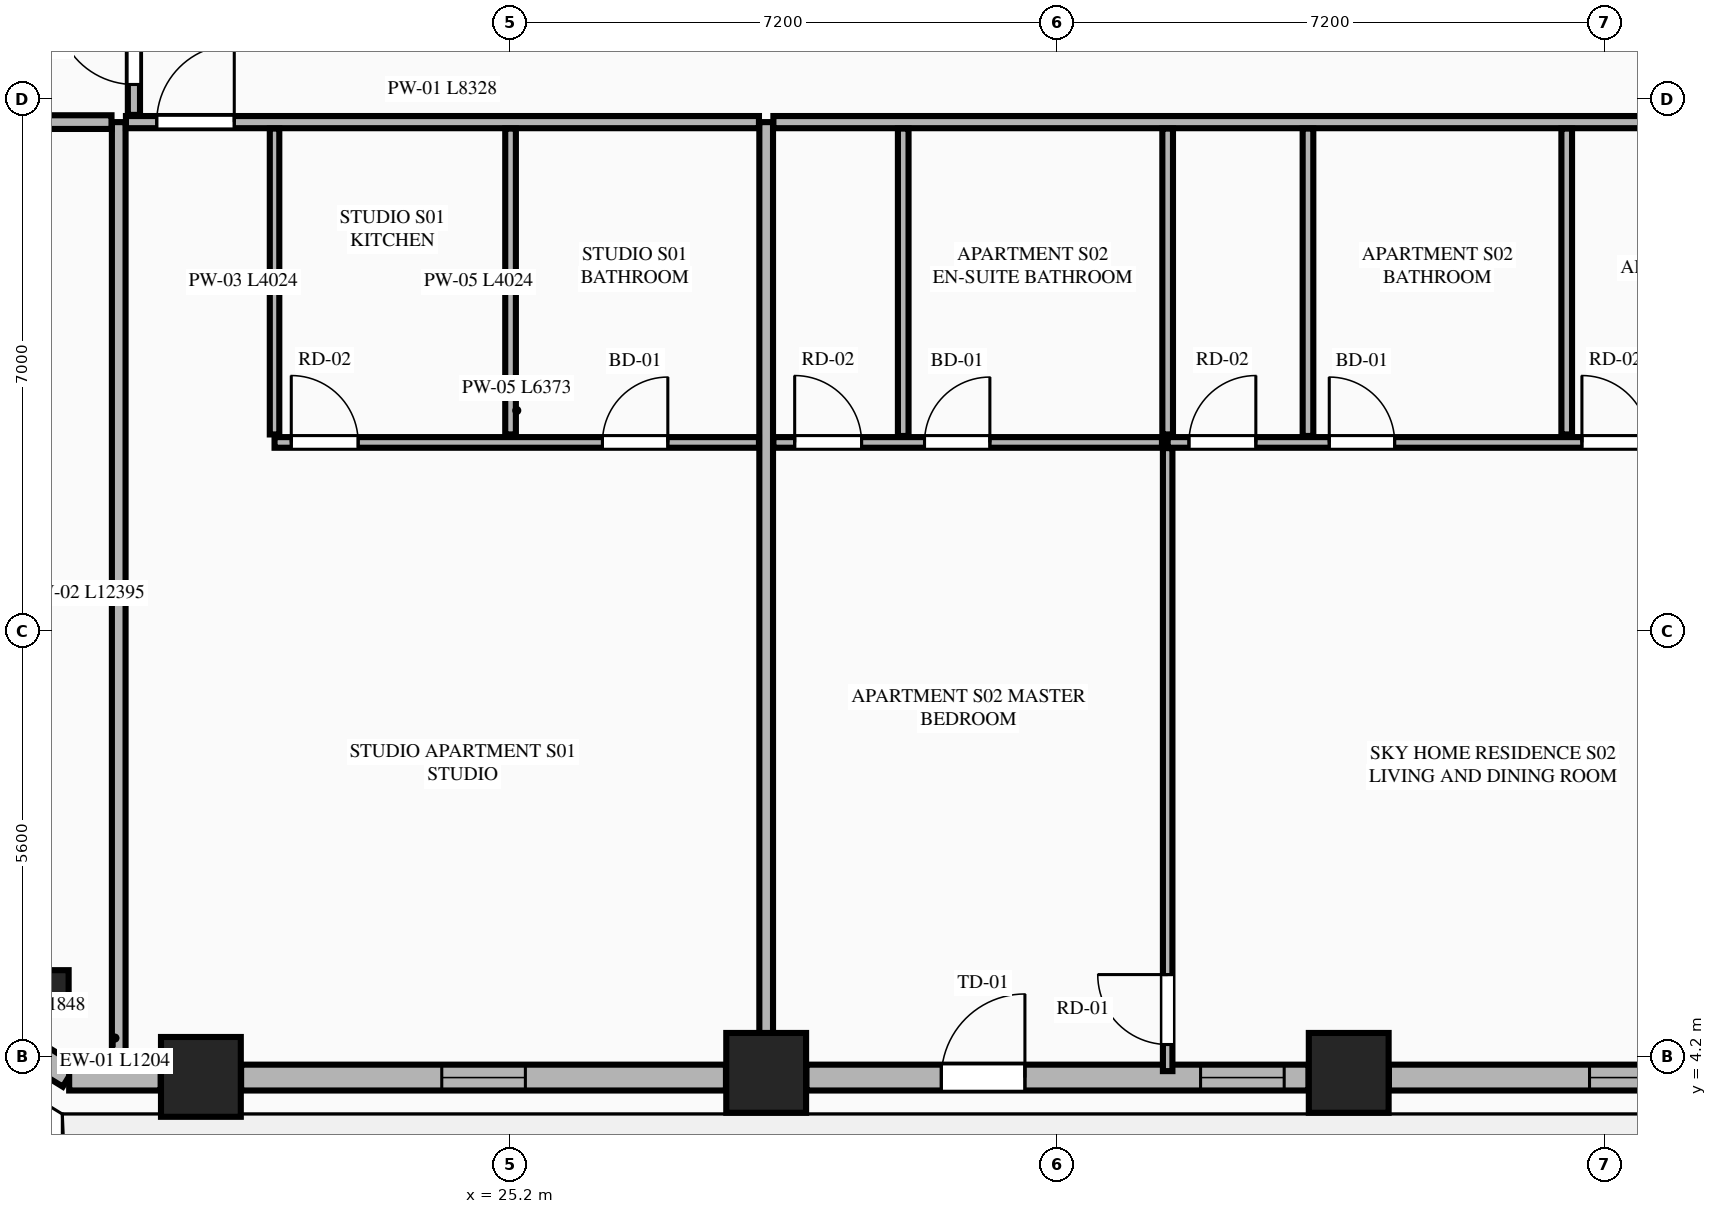
"""IFC4 building model, lengths in metres.
Left out: names, types, materials, properties, quantities, classifications, styles, units other than length and angle.
Written with IfcOpenShell. Run it as: python <this file> out.ifc"""

import sys

from ifc_helpers import new_model, si_unit, direction, frame, frame_2d, origin, origin_2d, place, context, subcontext, project, spatial, rectangle, extrude, element, fill, save


model = new_model("IFC4")
c1 = context("Model", 3, precision=1e-05, world=origin(), true_north=direction((0.0, 1.0)))
c2 = subcontext(c1, "Body", "Model", "MODEL_VIEW")
j1 = project(units=[si_unit("LENGTHUNIT", "METRE"), si_unit("PLANEANGLEUNIT", "RADIAN")], contexts=[c1])
p1 = place(None, origin())
s1 = spatial("IfcSite", under=j1, at=p1, CompositionType="ELEMENT")
p2 = place(p1, origin())
s2 = spatial("IfcBuilding", under=s1, at=p2, CompositionType="ELEMENT")
p3 = place(p2, frame((0.0, 0.0, 116.15)))
s3 = spatial("IfcBuildingStorey", under=s2, at=p3, CompositionType="ELEMENT", Elevation=116.15)
for number, where, z_axis, x_axis in (
    (1, (21.131, 3.939, 0.0), (0.0, 0.0, 1.0), (1.0, 0.0, 0.0)),
    (2, (28.568, 3.992, 0.0), (0.0, 0.0, 1.0), (1.0, 0.0, 0.0)),
    (3, (36.232, 3.992, 0.0), (0.0, 0.0, 1.0), (1.0, 0.0, 0.0)),
):
    element("IfcColumn", number, at=place(p3, frame(where, z_axis=z_axis, x_axis=x_axis)), inside=s3, PredefinedType="COLUMN", context=c2, shape_type="SweptSolid", body=[
        extrude(rectangle(XDim=1.05, YDim=1.05, at=origin_2d()), origin(), (0.0, 0.0, 1.0), 3.55),
    ])
p4 = place(p3, frame((19.141, 5.093, 0.0), z_axis=(0.0, 0.0, 1.0), x_axis=(0.865160173452, -0.501495637342, 0.0)))
e4 = element("IfcColumn", 4, at=p4, inside=s3, PredefinedType="PILASTER", context=c2, shape_type="SweptSolid", body=[
    extrude(rectangle(XDim=0.5, YDim=0.35, at=origin_2d()), origin(), (0.0, 0.0, 1.0), 3.55),
])
p5 = place(p3, frame((17.829, 4.923, 0.0), z_axis=(0.0, 0.0, 1.0), x_axis=(0.851798915137, -0.523868884523, 0.0)))
e5 = element("IfcWall", 5, at=p5, inside=s3, PredefinedType="STANDARD", context=c2, shape_type="SweptSolid", body=[
    extrude(rectangle(XDim=1.848, YDim=0.34, at=frame_2d((0.924, 0.0))), origin(), (0.0, 0.0, 1.0), 3.34),
])
p6 = place(p3, frame((19.398, 3.93, 0.0), z_axis=(0.0, 0.0, 1.0), x_axis=(1.0, 0.0, 0.0)))
e6 = element("IfcWall", 6, at=p6, inside=s3, PredefinedType="STANDARD", context=c2, shape_type="SweptSolid", body=[
    extrude(rectangle(XDim=1.204, YDim=0.34, at=frame_2d((0.602, 0.0))), origin(), (0.0, 0.0, 1.0), 3.34),
])
p7 = place(p3, frame((21.66, 3.93, 0.0), z_axis=(0.0, 0.0, 1.0), x_axis=(1.0, 0.0, 0.0)))
e7 = element("IfcWall", 7, at=p7, inside=s3, PredefinedType="STANDARD", context=c2, shape_type="SweptSolid", body=[
    extrude(rectangle(XDim=6.379, YDim=0.34, at=frame_2d((3.189, 0.0))), origin(), (0.0, 0.0, 1.0), 2.797),
])
p8 = place(p7, frame((2.64, 0.0, 0.75)))
e8 = element("IfcOpeningElement", 8, at=p8, cuts=e7, PredefinedType="OPENING", context=c2, shape_type="SweptSolid", body=[
    extrude(rectangle(XDim=1.1, YDim=1.897, at=frame_2d((0.55, 0.948))), frame((0.0, 0.18, 0.0), z_axis=(0.0, -1.0, 0.0), x_axis=(1.0, 0.0, 0.0)), (0.0, 0.0, 1.0), 0.36),
])
p9 = place(p3, frame((29.097, 3.93, 0.0), z_axis=(0.0, 0.0, 1.0), x_axis=(1.0, 0.0, 0.0)))
e9 = element("IfcWall", 9, at=p9, inside=s3, PredefinedType="STANDARD", context=c2, shape_type="SweptSolid", body=[
    extrude(rectangle(XDim=6.606, YDim=0.34, at=frame_2d((3.303, 0.0))), origin(), (0.0, 0.0, 1.0), 2.797),
])
p10 = place(p9, frame((1.775, 0.0, 0.0)))
e10 = element("IfcOpeningElement", 10, at=p10, cuts=e9, PredefinedType="OPENING", context=c2, shape_type="SweptSolid", body=[
    extrude(rectangle(XDim=1.1, YDim=2.25, at=frame_2d((0.55, 1.125))), frame((0.0, 0.18, 0.0), z_axis=(0.0, -1.0, 0.0), x_axis=(1.0, 0.0, 0.0)), (0.0, 0.0, 1.0), 0.36),
])
p11 = place(p9, frame((5.186, 0.0, 0.75)))
e11 = element("IfcOpeningElement", 11, at=p11, cuts=e9, PredefinedType="OPENING", context=c2, shape_type="SweptSolid", body=[
    extrude(rectangle(XDim=1.1, YDim=1.897, at=frame_2d((0.55, 0.948))), frame((0.0, 0.18, 0.0), z_axis=(0.0, -1.0, 0.0), x_axis=(1.0, 0.0, 0.0)), (0.0, 0.0, 1.0), 0.36),
])
p12 = place(p3, frame((36.761, 3.93, 0.0), z_axis=(0.0, 0.0, 1.0), x_axis=(1.0, 0.0, 0.0)))
e12 = element("IfcWall", 12, at=p12, inside=s3, PredefinedType="STANDARD", context=c2, shape_type="SweptSolid", body=[
    extrude(rectangle(XDim=6.379, YDim=0.34, at=frame_2d((3.189, 0.0))), origin(), (0.0, 0.0, 1.0), 2.797),
])
p13 = place(p12, frame((2.639, 0.0, 0.75)))
e13 = element("IfcOpeningElement", 13, at=p13, cuts=e12, PredefinedType="OPENING", context=c2, shape_type="SweptSolid", body=[
    extrude(rectangle(XDim=1.1, YDim=1.897, at=frame_2d((0.55, 0.948))), frame((0.0, 0.18, 0.0), z_axis=(0.0, -1.0, 0.0), x_axis=(1.0, 0.0, 0.0)), (0.0, 0.0, 1.0), 0.36),
])
p14 = place(p3, frame((20.05, 4.105, 0.0), z_axis=(0.0, 0.0, 1.0), x_axis=(0.0, 1.0, 0.0)))
e14 = element("IfcWall", 14, at=p14, inside=s3, PredefinedType="PARTITIONING", context=c2, shape_type="SweptSolid", body=[
    extrude(rectangle(XDim=12.395, YDim=0.18, at=frame_2d((6.198, 0.0))), origin(), (0.0, 0.0, 1.0), 3.34),
])
p15 = place(p3, frame((28.568, 4.105, 0.0), z_axis=(0.0, 0.0, 1.0), x_axis=(0.0, 1.0, 0.0)))
e15 = element("IfcWall", 15, at=p15, inside=s3, PredefinedType="PARTITIONING", context=c2, shape_type="SweptSolid", body=[
    extrude(rectangle(XDim=12.395, YDim=0.18, at=frame_2d((6.198, 0.0))), origin(), (0.0, 0.0, 1.0), 2.722),
])
p16 = place(p3, frame((20.145, 16.5, 0.0), z_axis=(0.0, 0.0, 1.0), x_axis=(1.0, 0.0, 0.0)))
e16 = element("IfcWall", 16, at=p16, inside=s3, PredefinedType="PARTITIONING", context=c2, shape_type="SweptSolid", body=[
    extrude(rectangle(XDim=8.328, YDim=0.16, at=frame_2d((4.164, 0.0))), origin(), (0.0, 0.0, 1.0), 3.34),
])
p17 = place(p16, frame((0.405, 0.0, 0.0)))
e17 = element("IfcOpeningElement", 17, at=p17, cuts=e16, PredefinedType="OPENING", context=c2, shape_type="SweptSolid", body=[
    extrude(rectangle(XDim=1.02, YDim=2.25, at=frame_2d((0.51, 1.125))), frame((0.0, 0.09, 0.0), z_axis=(0.0, -1.0, 0.0), x_axis=(1.0, 0.0, 0.0)), (0.0, 0.0, 1.0), 0.18),
])
p18 = place(p3, frame((22.1, 12.391, 0.0), z_axis=(0.0, 0.0, 1.0), x_axis=(0.0, 1.0, 0.0)))
e18 = element("IfcWall", 18, at=p18, inside=s3, PredefinedType="PARTITIONING", context=c2, shape_type="SweptSolid", body=[
    extrude(rectangle(XDim=4.024, YDim=0.125, at=frame_2d((2.012, 0.0))), origin(), (0.0, 0.0, 1.0), 2.722),
])
p19 = place(p3, frame((22.1, 12.286, 0.0), z_axis=(0.0, 0.0, 1.0), x_axis=(1.0, 0.0, 0.0)))
e19 = element("IfcWall", 19, at=p19, inside=s3, PredefinedType="PLUMBINGWALL", context=c2, shape_type="SweptSolid", body=[
    extrude(rectangle(XDim=6.373, YDim=0.14, at=frame_2d((3.187, 0.0))), origin(), (0.0, 0.0, 1.0), 3.34),
])
p20 = place(p19, frame((4.314, 0.0, 0.0)))
e20 = element("IfcOpeningElement", 20, at=p20, cuts=e19, PredefinedType="OPENING", context=c2, shape_type="SweptSolid", body=[
    extrude(rectangle(XDim=0.86, YDim=2.1, at=frame_2d((0.43, 1.05))), frame((0.0, 0.08, 0.0), z_axis=(0.0, -1.0, 0.0), x_axis=(1.0, 0.0, 0.0)), (0.0, 0.0, 1.0), 0.16),
])
p21 = place(p19, frame((0.22, 0.0, 0.0)))
e21 = element("IfcOpeningElement", 21, at=p21, cuts=e19, PredefinedType="OPENING", context=c2, shape_type="SweptSolid", body=[
    extrude(rectangle(XDim=0.88, YDim=2.15, at=frame_2d((0.44, 1.075))), frame((0.0, 0.08, 0.0), z_axis=(0.0, -1.0, 0.0), x_axis=(1.0, 0.0, 0.0)), (0.0, 0.0, 1.0), 0.16),
])
p22 = place(p3, frame((25.205, 12.391, 0.0), z_axis=(0.0, 0.0, 1.0), x_axis=(0.0, 1.0, 0.0)))
e22 = element("IfcWall", 22, at=p22, inside=s3, PredefinedType="PLUMBINGWALL", context=c2, shape_type="SweptSolid", body=[
    extrude(rectangle(XDim=4.024, YDim=0.14, at=frame_2d((2.012, 0.0))), origin(), (0.0, 0.0, 1.0), 3.34),
])
p23 = place(p3, frame((28.663, 16.5, 0.0), z_axis=(0.0, 0.0, 1.0), x_axis=(1.0, 0.0, 0.0)))
e23 = element("IfcWall", 23, at=p23, inside=s3, PredefinedType="PARTITIONING", context=c2, shape_type="SweptSolid", body=[
    extrude(rectangle(XDim=15.992, YDim=0.16, at=frame_2d((7.996, 0.0))), origin(), (0.0, 0.0, 1.0), 3.34),
])
p24 = place(p23, frame((14.087, 0.0, 0.0)))
e24 = element("IfcOpeningElement", 24, at=p24, cuts=e23, PredefinedType="OPENING", context=c2, shape_type="SweptSolid", body=[
    extrude(rectangle(XDim=1.02, YDim=2.25, at=frame_2d((0.51, 1.125))), frame((0.0, 0.09, 0.0), z_axis=(0.0, -1.0, 0.0), x_axis=(1.0, 0.0, 0.0)), (0.0, 0.0, 1.0), 0.18),
])
p25 = place(p3, frame((33.85, 12.286, 0.0), z_axis=(0.0, 0.0, 1.0), x_axis=(1.0, 0.0, 0.0)))
e25 = element("IfcWall", 25, at=p25, inside=s3, PredefinedType="PLUMBINGWALL", context=c2, shape_type="SweptSolid", body=[
    extrude(rectangle(XDim=8.65, YDim=0.14, at=frame_2d((4.325, 0.0))), origin(), (0.0, 0.0, 1.0), 3.34),
])
p26 = place(p25, frame((0.28, 0.0, 0.0)))
e26 = element("IfcOpeningElement", 26, at=p26, cuts=e25, PredefinedType="OPENING", context=c2, shape_type="SweptSolid", body=[
    extrude(rectangle(XDim=0.88, YDim=2.15, at=frame_2d((0.44, 1.075))), frame((0.0, 0.08, 0.0), z_axis=(0.0, -1.0, 0.0), x_axis=(1.0, 0.0, 0.0)), (0.0, 0.0, 1.0), 0.16),
])
p27 = place(p25, frame((2.126, 0.0, 0.0)))
e27 = element("IfcOpeningElement", 27, at=p27, cuts=e25, PredefinedType="OPENING", context=c2, shape_type="SweptSolid", body=[
    extrude(rectangle(XDim=0.86, YDim=2.1, at=frame_2d((0.43, 1.05))), frame((0.0, 0.08, 0.0), z_axis=(0.0, -1.0, 0.0), x_axis=(1.0, 0.0, 0.0)), (0.0, 0.0, 1.0), 0.16),
])
p28 = place(p25, frame((5.45, 0.0, 0.0)))
e28 = element("IfcOpeningElement", 28, at=p28, cuts=e25, PredefinedType="OPENING", context=c2, shape_type="SweptSolid", body=[
    extrude(rectangle(XDim=0.88, YDim=2.15, at=frame_2d((0.44, 1.075))), frame((0.0, 0.08, 0.0), z_axis=(0.0, -1.0, 0.0), x_axis=(1.0, 0.0, 0.0)), (0.0, 0.0, 1.0), 0.16),
])
p29 = place(p3, frame((28.663, 12.286, 0.0), z_axis=(0.0, 0.0, 1.0), x_axis=(1.0, 0.0, 0.0)))
e29 = element("IfcWall", 29, at=p29, inside=s3, PredefinedType="PLUMBINGWALL", context=c2, shape_type="SweptSolid", body=[
    extrude(rectangle(XDim=5.112, YDim=0.14, at=frame_2d((2.556, 0.0))), origin(), (0.0, 0.0, 1.0), 3.34),
])
p30 = place(p29, frame((0.28, 0.0, 0.0)))
e30 = element("IfcOpeningElement", 30, at=p30, cuts=e29, PredefinedType="OPENING", context=c2, shape_type="SweptSolid", body=[
    extrude(rectangle(XDim=0.88, YDim=2.15, at=frame_2d((0.44, 1.075))), frame((0.0, 0.08, 0.0), z_axis=(0.0, -1.0, 0.0), x_axis=(1.0, 0.0, 0.0)), (0.0, 0.0, 1.0), 0.16),
])
p31 = place(p29, frame((1.988, 0.0, 0.0)))
e31 = element("IfcOpeningElement", 31, at=p31, cuts=e29, PredefinedType="OPENING", context=c2, shape_type="SweptSolid", body=[
    extrude(rectangle(XDim=0.86, YDim=2.1, at=frame_2d((0.43, 1.05))), frame((0.0, 0.08, 0.0), z_axis=(0.0, -1.0, 0.0), x_axis=(1.0, 0.0, 0.0)), (0.0, 0.0, 1.0), 0.16),
])
for number, where, z_axis, x_axis in (
    (32, (39.1, 12.391, 0.0), (0.0, 0.0, 1.0), (0.0, 1.0, 0.0)),
    (33, (33.85, 12.391, 0.0), (0.0, 0.0, 1.0), (0.0, 1.0, 0.0)),
):
    element("IfcWall", number, at=place(p3, frame(where, z_axis=z_axis, x_axis=x_axis)), inside=s3, PredefinedType="PLUMBINGWALL", context=c2, shape_type="SweptSolid", body=[
        extrude(rectangle(XDim=4.024, YDim=0.14, at=frame_2d((2.012, 0.0))), origin(), (0.0, 0.0, 1.0), 3.34),
    ])
p32 = place(p3, frame((33.85, 4.015, 0.0), z_axis=(0.0, 0.0, 1.0), x_axis=(0.0, 1.0, 0.0)))
e34 = element("IfcWall", 34, at=p32, inside=s3, PredefinedType="PARTITIONING", context=c2, shape_type="SweptSolid", body=[
    extrude(rectangle(XDim=8.196, YDim=0.125, at=frame_2d((4.098, 0.0))), origin(), (0.0, 0.0, 1.0), 3.34),
])
p33 = place(p32, frame((0.35, 0.0, 0.0)))
e35 = element("IfcOpeningElement", 35, at=p33, cuts=e34, PredefinedType="OPENING", context=c2, shape_type="SweptSolid", body=[
    extrude(rectangle(XDim=0.92, YDim=2.15, at=frame_2d((0.46, 1.075))), frame((0.0, 0.073, 0.0), z_axis=(0.0, -1.0, 0.0), x_axis=(1.0, 0.0, 0.0)), (0.0, 0.0, 1.0), 0.145),
])
for number, where, z_axis, x_axis in (
    (36, (35.696, 12.371, 0.0), (0.0, 0.0, 1.0), (0.0, 1.0, 0.0)),
    (37, (30.371, 12.371, 0.0), (0.0, 0.0, 1.0), (0.0, 1.0, 0.0)),
):
    element("IfcWall", number, at=place(p3, frame(where, z_axis=z_axis, x_axis=x_axis)), inside=s3, PredefinedType="PLUMBINGWALL", context=c2, shape_type="SweptSolid", body=[
        extrude(rectangle(XDim=4.044, YDim=0.14, at=frame_2d((2.022, 0.0))), origin(), (0.0, 0.0, 1.0), 3.34),
    ])
p34 = place(p3, frame((12.185, 16.5, 0.0), z_axis=(0.0, 0.0, 1.0), x_axis=(1.0, 0.0, 0.0)))
e38 = element("IfcWall", 38, at=p34, inside=s3, PredefinedType="PARTITIONING", context=c2, shape_type="SweptSolid", body=[
    extrude(rectangle(XDim=7.77, YDim=0.18, at=frame_2d((3.885, 0.0))), origin(), (0.0, 0.0, 1.0), 3.34),
])
p35 = place(p3, frame((20.25, 16.595, 0.0), z_axis=(0.0, 0.0, 1.0), x_axis=(0.0, 1.0, 0.0)))
e39 = element("IfcWall", 39, at=p35, inside=s3, PredefinedType="PARTITIONING", context=c2, shape_type="SweptSolid", body=[
    extrude(rectangle(XDim=6.39, YDim=0.16, at=frame_2d((3.195, 0.0))), origin(), (0.0, 0.0, 1.0), 3.34),
])
p36 = place(p35, frame((0.4, 0.0, 0.0)))
e40 = element("IfcOpeningElement", 40, at=p36, cuts=e39, PredefinedType="OPENING", context=c2, shape_type="SweptSolid", body=[
    extrude(rectangle(XDim=1.02, YDim=2.25, at=frame_2d((0.51, 1.125))), frame((0.0, 0.09, 0.0), z_axis=(0.0, -1.0, 0.0), x_axis=(1.0, 0.0, 0.0)), (0.0, 0.0, 1.0), 0.18),
])
p37 = place(p8, origin())
e41 = element("IfcWindow", 41, at=p37, inside=s3, PartitioningType="SINGLE_PANEL", PredefinedType="WINDOW", context=c2, shape_type="SweptSolid", body=[
    extrude(rectangle(XDim=1.1, YDim=1.897, at=frame_2d((0.55, 0.948))), frame((0.0, 0.03, 0.0), z_axis=(0.0, -1.0, 0.0), x_axis=(1.0, 0.0, 0.0)), (0.0, 0.0, 1.0), 0.06),
])
fill(e8, e41)
p38 = place(p10, origin())
e42 = element("IfcDoor", 42, at=p38, inside=s3, OperationType="SINGLE_SWING_RIGHT", PredefinedType="DOOR", context=c2, shape_type="SweptSolid", body=[
    extrude(rectangle(XDim=1.1, YDim=2.25, at=frame_2d((0.55, 1.125))), frame((0.0, 0.025, 0.0), z_axis=(0.0, -1.0, 0.0), x_axis=(1.0, 0.0, 0.0)), (0.0, 0.0, 1.0), 0.05),
])
fill(e10, e42)
p39 = place(p13, origin())
e43 = element("IfcWindow", 43, at=p39, inside=s3, PartitioningType="SINGLE_PANEL", PredefinedType="WINDOW", context=c2, shape_type="SweptSolid", body=[
    extrude(rectangle(XDim=1.1, YDim=1.897, at=frame_2d((0.55, 0.948))), frame((0.0, 0.03, 0.0), z_axis=(0.0, -1.0, 0.0), x_axis=(1.0, 0.0, 0.0)), (0.0, 0.0, 1.0), 0.06),
])
fill(e13, e43)
p40 = place(p20, origin())
e44 = element("IfcDoor", 44, at=p40, inside=s3, OperationType="SINGLE_SWING_RIGHT", PredefinedType="DOOR", context=c2, shape_type="SweptSolid", body=[
    extrude(rectangle(XDim=0.86, YDim=2.1, at=frame_2d((0.43, 1.05))), frame((0.0, 0.025, 0.0), z_axis=(0.0, -1.0, 0.0), x_axis=(1.0, 0.0, 0.0)), (0.0, 0.0, 1.0), 0.05),
])
fill(e20, e44)
p41 = place(p17, origin())
e45 = element("IfcDoor", 45, at=p41, inside=s3, OperationType="SINGLE_SWING_RIGHT", PredefinedType="DOOR", context=c2, shape_type="SweptSolid", body=[
    extrude(rectangle(XDim=1.02, YDim=2.25, at=frame_2d((0.51, 1.125))), frame((0.0, 0.025, 0.0), z_axis=(0.0, -1.0, 0.0), x_axis=(1.0, 0.0, 0.0)), (0.0, 0.0, 1.0), 0.05),
])
fill(e17, e45)
p42 = place(p21, origin())
e46 = element("IfcDoor", 46, at=p42, inside=s3, OperationType="SINGLE_SWING_LEFT", PredefinedType="DOOR", context=c2, shape_type="SweptSolid", body=[
    extrude(rectangle(XDim=0.88, YDim=2.15, at=frame_2d((0.44, 1.075))), frame((0.0, 0.025, 0.0), z_axis=(0.0, -1.0, 0.0), x_axis=(1.0, 0.0, 0.0)), (0.0, 0.0, 1.0), 0.05),
])
fill(e21, e46)
p43 = place(p26, origin())
e47 = element("IfcDoor", 47, at=p43, inside=s3, OperationType="SINGLE_SWING_RIGHT", PredefinedType="DOOR", context=c2, shape_type="SweptSolid", body=[
    extrude(rectangle(XDim=0.88, YDim=2.15, at=frame_2d((0.44, 1.075))), frame((0.0, 0.025, 0.0), z_axis=(0.0, -1.0, 0.0), x_axis=(1.0, 0.0, 0.0)), (0.0, 0.0, 1.0), 0.05),
])
fill(e26, e47)
p44 = place(p27, origin())
e48 = element("IfcDoor", 48, at=p44, inside=s3, OperationType="SINGLE_SWING_LEFT", PredefinedType="DOOR", context=c2, shape_type="SweptSolid", body=[
    extrude(rectangle(XDim=0.86, YDim=2.1, at=frame_2d((0.43, 1.05))), frame((0.0, 0.025, 0.0), z_axis=(0.0, -1.0, 0.0), x_axis=(1.0, 0.0, 0.0)), (0.0, 0.0, 1.0), 0.05),
])
fill(e27, e48)
p45 = place(p30, origin())
e49 = element("IfcDoor", 49, at=p45, inside=s3, OperationType="SINGLE_SWING_LEFT", PredefinedType="DOOR", context=c2, shape_type="SweptSolid", body=[
    extrude(rectangle(XDim=0.88, YDim=2.15, at=frame_2d((0.44, 1.075))), frame((0.0, 0.025, 0.0), z_axis=(0.0, -1.0, 0.0), x_axis=(1.0, 0.0, 0.0)), (0.0, 0.0, 1.0), 0.05),
])
fill(e30, e49)
p46 = place(p31, origin())
e50 = element("IfcDoor", 50, at=p46, inside=s3, OperationType="SINGLE_SWING_RIGHT", PredefinedType="DOOR", context=c2, shape_type="SweptSolid", body=[
    extrude(rectangle(XDim=0.86, YDim=2.1, at=frame_2d((0.43, 1.05))), frame((0.0, 0.025, 0.0), z_axis=(0.0, -1.0, 0.0), x_axis=(1.0, 0.0, 0.0)), (0.0, 0.0, 1.0), 0.05),
])
fill(e31, e50)
p47 = place(p28, origin())
e51 = element("IfcDoor", 51, at=p47, inside=s3, OperationType="SINGLE_SWING_LEFT", PredefinedType="DOOR", context=c2, shape_type="SweptSolid", body=[
    extrude(rectangle(XDim=0.88, YDim=2.15, at=frame_2d((0.44, 1.075))), frame((0.0, 0.025, 0.0), z_axis=(0.0, -1.0, 0.0), x_axis=(1.0, 0.0, 0.0)), (0.0, 0.0, 1.0), 0.05),
])
fill(e28, e51)
p48 = place(p33, origin())
e52 = element("IfcDoor", 52, at=p48, inside=s3, OperationType="SINGLE_SWING_RIGHT", PredefinedType="DOOR", context=c2, shape_type="SweptSolid", body=[
    extrude(rectangle(XDim=0.92, YDim=2.15, at=frame_2d((0.46, 1.075))), frame((0.0, 0.025, 0.0), z_axis=(0.0, -1.0, 0.0), x_axis=(1.0, 0.0, 0.0)), (0.0, 0.0, 1.0), 0.05),
])
fill(e35, e52)
p49 = place(p36, origin())
e53 = element("IfcDoor", 53, at=p49, inside=s3, OperationType="SINGLE_SWING_RIGHT", PredefinedType="DOOR", context=c2, shape_type="SweptSolid", body=[
    extrude(rectangle(XDim=1.02, YDim=2.25, at=frame_2d((0.51, 1.125))), frame((0.0, 0.025, 0.0), z_axis=(0.0, -1.0, 0.0), x_axis=(1.0, 0.0, 0.0)), (0.0, 0.0, 1.0), 0.05),
])
fill(e40, e53)
p50 = place(p11, origin())
e54 = element("IfcWindow", 54, at=p50, inside=s3, PartitioningType="SINGLE_PANEL", PredefinedType="WINDOW", context=c2, shape_type="SweptSolid", body=[
    extrude(rectangle(XDim=1.1, YDim=1.897, at=frame_2d((0.55, 0.948))), frame((0.0, 0.03, 0.0), z_axis=(0.0, -1.0, 0.0), x_axis=(1.0, 0.0, 0.0)), (0.0, 0.0, 1.0), 0.06),
])
fill(e11, e54)
save(model, sys.argv[1])
